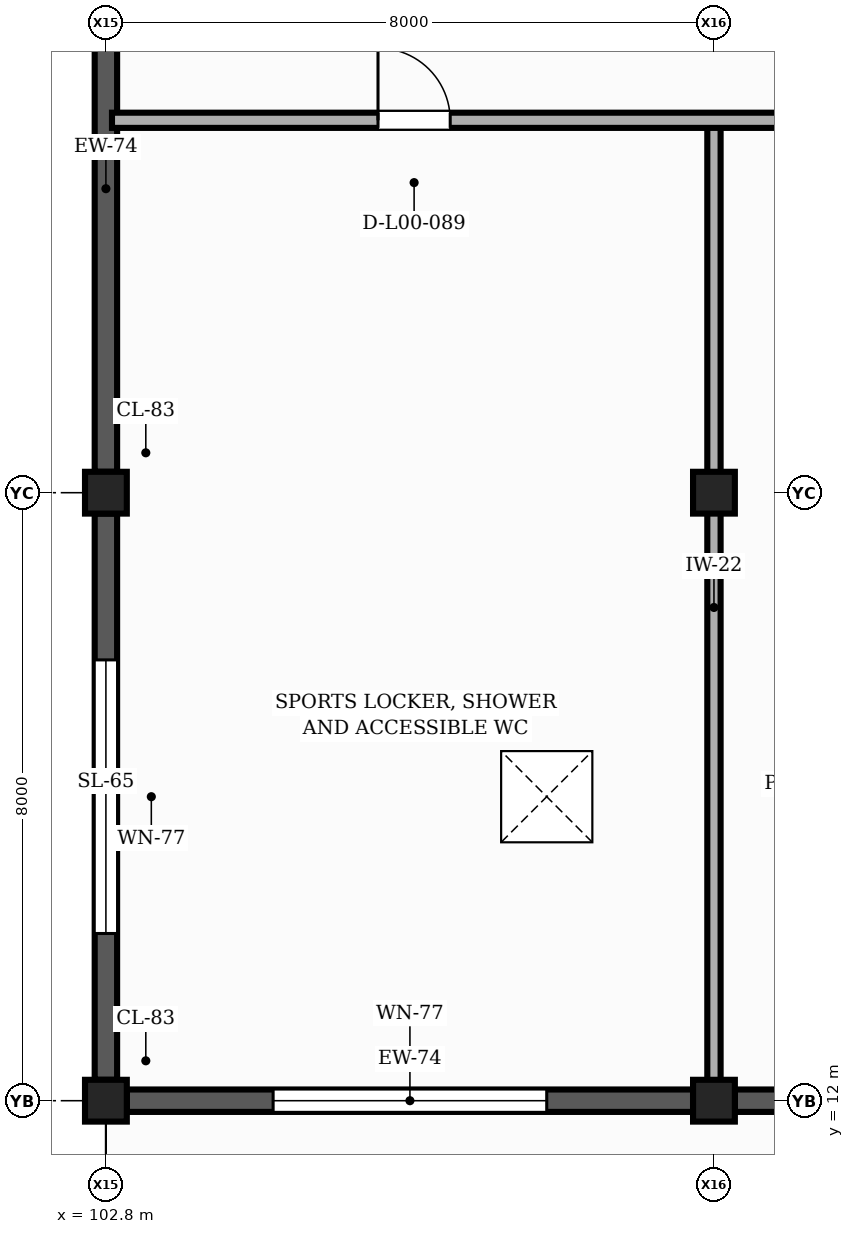
"""IFC4 building model, lengths in metres.
Left out: names, types, materials, properties, quantities, classifications, styles, units other than length and angle.
Written with IfcOpenShell. Run it as: python <this file> out.ifc"""

import sys

from ifc_helpers import new_model, si_unit, direction, frame, frame_2d, origin, origin_2d, place, context, subcontext, project, spatial, rectangle, extrude, element, fill, save


model = new_model("IFC4")
c1 = context("Model", 3, precision=1e-05, world=origin(), true_north=direction((0.0, 1.0)))
c2 = subcontext(c1, "Body", "Model", "MODEL_VIEW")
j1 = project(units=[si_unit("LENGTHUNIT", "METRE"), si_unit("PLANEANGLEUNIT", "RADIAN")], contexts=[c1])
p1 = place(None, origin())
s1 = spatial("IfcSite", under=j1, at=p1, CompositionType="ELEMENT")
p2 = place(p1, origin())
s2 = spatial("IfcBuilding", under=s1, at=p2, CompositionType="ELEMENT")
p3 = place(p2, origin())
s3 = spatial("IfcBuildingStorey", under=s2, at=p3, CompositionType="ELEMENT", Elevation=0.0)
for number, where, z_axis, x_axis in (
    (1, (102.8, 12.0, -0.5), (0.0, 0.0, 1.0), (1.0, 0.0, 0.0)),
    (2, (102.8, 20.0, -0.5), (0.0, 0.0, 1.0), (1.0, 0.0, 0.0)),
    (3, (110.8, 12.0, -0.5), (0.0, 0.0, 1.0), (1.0, 0.0, 0.0)),
    (4, (110.8, 20.0, -0.5), (0.0, 0.0, 1.0), (1.0, 0.0, 0.0)),
):
    element("IfcColumn", number, at=place(p3, frame(where, z_axis=z_axis, x_axis=x_axis)), inside=s3, PredefinedType="COLUMN", context=c2, shape_type="SweptSolid", body=[
        extrude(rectangle(XDim=0.55, YDim=0.55, at=origin_2d()), origin(), (0.0, 0.0, 1.0), 5.3),
    ])
p4 = place(p3, frame((103.075, 12.0, -0.42), z_axis=(0.0, 0.0, 1.0), x_axis=(1.0, 0.0, 0.0)))
e5 = element("IfcWall", 5, at=p4, inside=s3, PredefinedType="SOLIDWALL", context=c2, shape_type="SweptSolid", body=[
    extrude(rectangle(XDim=7.45, YDim=0.295, at=frame_2d((3.725, 0.0))), origin(), (0.0, 0.0, 1.0), 4.333),
])
p5 = place(p4, frame((1.925, 0.0, 2.47)))
e6 = element("IfcOpeningElement", 6, at=p5, cuts=e5, PredefinedType="OPENING", context=c2, shape_type="SweptSolid", body=[
    extrude(rectangle(XDim=3.6, YDim=1.2, at=frame_2d((1.8, 0.6))), frame((0.0, 0.157, 0.0), z_axis=(0.0, -1.0, 0.0), x_axis=(1.0, 0.0, 0.0)), (0.0, 0.0, 1.0), 0.315),
])
p6 = place(p3, frame((111.075, 12.0, -0.42), z_axis=(0.0, 0.0, 1.0), x_axis=(1.0, 0.0, 0.0)))
e7 = element("IfcWall", 7, at=p6, inside=s3, PredefinedType="SOLIDWALL", context=c2, shape_type="SweptSolid", body=[
    extrude(rectangle(XDim=7.45, YDim=0.295, at=frame_2d((3.725, 0.0))), origin(), (0.0, 0.0, 1.0), 4.333),
])
p7 = place(p6, frame((1.925, 0.0, 2.47)))
e8 = element("IfcOpeningElement", 8, at=p7, cuts=e7, PredefinedType="OPENING", context=c2, shape_type="SweptSolid", body=[
    extrude(rectangle(XDim=3.6, YDim=1.2, at=frame_2d((1.8, 0.6))), frame((0.0, 0.157, 0.0), z_axis=(0.0, -1.0, 0.0), x_axis=(1.0, 0.0, 0.0)), (0.0, 0.0, 1.0), 0.315),
])
p8 = place(p3, frame((102.8, 27.725, -0.42), z_axis=(0.0, 0.0, 1.0), x_axis=(0.0, -1.0, 0.0)))
e9 = element("IfcWall", 9, at=p8, inside=s3, PredefinedType="SOLIDWALL", context=c2, shape_type="SweptSolid", body=[
    extrude(rectangle(XDim=7.45, YDim=0.295, at=frame_2d((3.725, 0.0))), origin(), (0.0, 0.0, 1.0), 4.488),
])
p9 = place(p3, frame((102.8, 19.725, -0.42), z_axis=(0.0, 0.0, 1.0), x_axis=(0.0, -1.0, 0.0)))
e10 = element("IfcWall", 10, at=p9, inside=s3, PredefinedType="SOLIDWALL", context=c2, shape_type="SweptSolid", body=[
    extrude(rectangle(XDim=7.45, YDim=0.295, at=frame_2d((3.725, 0.0))), origin(), (0.0, 0.0, 1.0), 4.488),
])
p10 = place(p9, frame((1.925, 0.0, 2.47)))
e11 = element("IfcOpeningElement", 11, at=p10, cuts=e10, PredefinedType="OPENING", context=c2, shape_type="SweptSolid", body=[
    extrude(rectangle(XDim=3.6, YDim=1.2, at=frame_2d((1.8, 0.6))), frame((0.0, 0.157, 0.0), z_axis=(0.0, -1.0, 0.0), x_axis=(1.0, 0.0, 0.0)), (0.0, 0.0, 1.0), 0.315),
])
p11 = place(p3, frame((110.8, 12.08, 0.0), z_axis=(0.0, 0.0, 1.0), x_axis=(0.0, 1.0, 0.0)))
e12 = element("IfcWall", 12, at=p11, inside=s3, PredefinedType="PARTITIONING", context=c2, shape_type="SweptSolid", body=[
    extrude(rectangle(XDim=12.82, YDim=0.175, at=frame_2d((6.41, 0.0))), origin(), (0.0, 0.0, 1.0), 3.898),
])
p12 = place(p3, frame((102.88, 24.9, 0.0), z_axis=(0.0, 0.0, 1.0), x_axis=(1.0, 0.0, 0.0)))
e13 = element("IfcWall", 13, at=p12, inside=s3, PredefinedType="PARTITIONING", context=c2, shape_type="SweptSolid", body=[
    extrude(rectangle(XDim=63.84, YDim=0.2, at=frame_2d((31.92, 0.0))), origin(), (0.0, 0.0, 1.0), 3.646),
])
p13 = place(p12, frame((3.5, 0.0, 0.0)))
e14 = element("IfcOpeningElement", 14, at=p13, cuts=e13, PredefinedType="OPENING", context=c2, shape_type="SweptSolid", body=[
    extrude(rectangle(XDim=0.95, YDim=2.15, at=frame_2d((0.475, 1.075))), frame((0.0, 0.11, 0.0), z_axis=(0.0, -1.0, 0.0), x_axis=(1.0, 0.0, 0.0)), (0.0, 0.0, 1.0), 0.22),
])
p14 = place(p12, frame((19.0, 0.0, 0.0)))
e15 = element("IfcOpeningElement", 15, at=p14, cuts=e13, PredefinedType="OPENING", context=c2, shape_type="SweptSolid", body=[
    extrude(rectangle(XDim=1.5, YDim=2.15, at=frame_2d((0.75, 1.075))), frame((0.0, 0.11, 0.0), z_axis=(0.0, -1.0, 0.0), x_axis=(1.0, 0.0, 0.0)), (0.0, 0.0, 1.0), 0.22),
])
p15 = place(p12, frame((45.0, 0.0, 0.0)))
e16 = element("IfcOpeningElement", 16, at=p15, cuts=e13, PredefinedType="OPENING", context=c2, shape_type="SweptSolid", body=[
    extrude(rectangle(XDim=1.2, YDim=2.15, at=frame_2d((0.6, 1.075))), frame((0.0, 0.11, 0.0), z_axis=(0.0, -1.0, 0.0), x_axis=(1.0, 0.0, 0.0)), (0.0, 0.0, 1.0), 0.22),
])
p16 = place(p5, origin())
e17 = element("IfcWindow", 17, at=p16, inside=s3, PartitioningType="SINGLE_PANEL", PredefinedType="WINDOW", context=c2, shape_type="SweptSolid", body=[
    extrude(rectangle(XDim=3.6, YDim=1.2, at=frame_2d((1.8, 0.6))), frame((0.0, 0.03, 0.0), z_axis=(0.0, -1.0, 0.0), x_axis=(1.0, 0.0, 0.0)), (0.0, 0.0, 1.0), 0.06),
])
fill(e6, e17)
p17 = place(p10, origin())
e18 = element("IfcWindow", 18, at=p17, inside=s3, PartitioningType="SINGLE_PANEL", PredefinedType="WINDOW", context=c2, shape_type="SweptSolid", body=[
    extrude(rectangle(XDim=3.6, YDim=1.2, at=frame_2d((1.8, 0.6))), frame((0.0, 0.03, 0.0), z_axis=(0.0, -1.0, 0.0), x_axis=(1.0, 0.0, 0.0)), (0.0, 0.0, 1.0), 0.06),
])
fill(e11, e18)
p18 = place(p13, origin())
e19 = element("IfcDoor", 19, at=p18, inside=s3, OperationType="SINGLE_SWING_LEFT", PredefinedType="DOOR", context=c2, shape_type="SweptSolid", body=[
    extrude(rectangle(XDim=0.95, YDim=2.15, at=frame_2d((0.475, 1.075))), frame((0.0, 0.025, 0.0), z_axis=(0.0, -1.0, 0.0), x_axis=(1.0, 0.0, 0.0)), (0.0, 0.0, 1.0), 0.05),
])
fill(e14, e19)
save(model, sys.argv[1])
